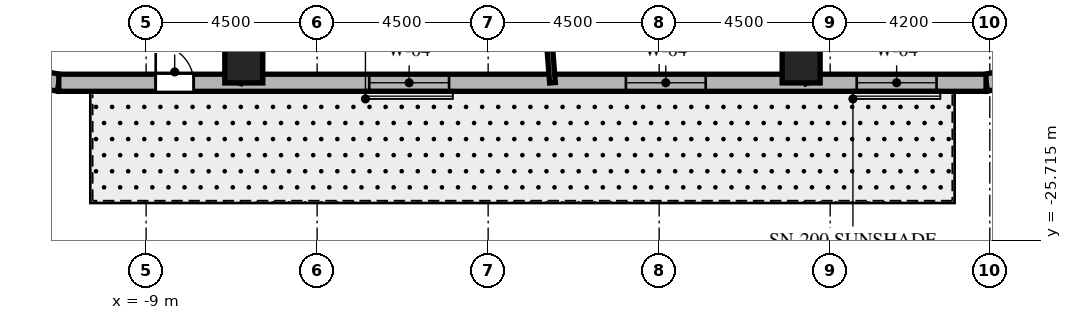
"""IFC4 building model, lengths in metres.
Left out: names, types, materials, properties, quantities, classifications, styles, units other than length and angle.
Written with IfcOpenShell. Run it as: python <this file> out.ifc"""

import sys

from ifc_helpers import new_model, si_unit, direction, frame, frame_2d, origin, origin_2d, place, context, subcontext, project, spatial, rectangle, extrude, element, fill, save


model = new_model("IFC4")
c1 = context("Model", 3, precision=1e-05, world=origin(), true_north=direction((0.0, 1.0)))
c2 = subcontext(c1, "Body", "Model", "MODEL_VIEW")
j1 = project(units=[si_unit("LENGTHUNIT", "METRE"), si_unit("PLANEANGLEUNIT", "RADIAN")], contexts=[c1])
p1 = place(None, origin())
s1 = spatial("IfcSite", under=j1, at=p1, CompositionType="ELEMENT")
p2 = place(p1, origin())
s2 = spatial("IfcBuilding", under=s1, at=p2, CompositionType="ELEMENT")
p3 = place(p2, frame((0.0, 0.0, 210.3)))
s3 = spatial("IfcBuildingStorey", under=s2, at=p3, CompositionType="ELEMENT", Elevation=210.3)
for number, where, z_axis, x_axis in (
    (1, (-6.43, -21.08, 0.0), (0.0, 0.0, 1.0), (1.0, 0.0, 0.0)),
    (2, (8.236, -21.08, 0.0), (0.0, 0.0, 1.0), (1.0, 0.0, 0.0)),
):
    element("IfcColumn", number, at=place(p3, frame(where, z_axis=z_axis, x_axis=x_axis)), inside=s3, PredefinedType="COLUMN", context=c2, shape_type="SweptSolid", body=[
        extrude(rectangle(XDim=1.0, YDim=1.0, at=origin_2d()), origin(), (0.0, 0.0, 1.0), 3.8),
    ])
p4 = place(p3, frame((-12.546, -21.34, 0.0), z_axis=(0.0, 0.0, 1.0), x_axis=(0.982686750835, -0.18527479519, 0.0)))
e3 = element("IfcWall", 3, at=p4, inside=s3, PredefinedType="SOLIDWALL", context=c2, shape_type="SweptSolid", body=[
    extrude(rectangle(XDim=1.27, YDim=0.45, at=frame_2d((0.635, 0.0))), origin(), (0.0, 0.0, 1.0), 3.5),
])
p5 = place(p3, frame((13.102, -21.575, 0.0), z_axis=(0.0, 0.0, 1.0), x_axis=(0.978757421505, 0.205021730188, 0.0)))
e4 = element("IfcWall", 4, at=p5, inside=s3, PredefinedType="SOLIDWALL", context=c2, shape_type="SweptSolid", body=[
    extrude(rectangle(XDim=1.406, YDim=0.45, at=frame_2d((0.703, 0.0))), origin(), (0.0, 0.0, 1.0), 3.5),
])
p6 = place(p3, frame((-11.298, -21.575, 0.0), z_axis=(0.0, 0.0, 1.0), x_axis=(1.0, 0.0, 0.0)))
e5 = element("IfcWall", 5, at=p6, inside=s3, PredefinedType="SOLIDWALL", context=c2, shape_type="SweptSolid", body=[
    extrude(rectangle(XDim=24.399, YDim=0.45, at=frame_2d((12.2, 0.0))), origin(), (0.0, 0.0, 1.0), 3.5),
])
p7 = place(p6, frame((2.55, 0.0, 0.0)))
e6 = element("IfcOpeningElement", 6, at=p7, cuts=e5, PredefinedType="OPENING", context=c2, shape_type="SweptSolid", body=[
    extrude(rectangle(XDim=1.0, YDim=2.15, at=frame_2d((0.5, 1.075))), frame((0.0, 0.235, 0.0), z_axis=(0.0, -1.0, 0.0), x_axis=(1.0, 0.0, 0.0)), (0.0, 0.0, 1.0), 0.47),
])
p8 = place(p6, frame((8.169, 0.0, 0.8)))
e7 = element("IfcOpeningElement", 7, at=p8, cuts=e5, PredefinedType="OPENING", context=c2, shape_type="SweptSolid", body=[
    extrude(rectangle(XDim=2.1, YDim=1.85, at=frame_2d((1.05, 0.925))), frame((0.0, 0.235, 0.0), z_axis=(0.0, -1.0, 0.0), x_axis=(1.0, 0.0, 0.0)), (0.0, 0.0, 1.0), 0.47),
])
p9 = place(p6, frame((14.922, 0.0, 0.8)))
e8 = element("IfcOpeningElement", 8, at=p9, cuts=e5, PredefinedType="OPENING", context=c2, shape_type="SweptSolid", body=[
    extrude(rectangle(XDim=2.1, YDim=1.85, at=frame_2d((1.05, 0.925))), frame((0.0, 0.235, 0.0), z_axis=(0.0, -1.0, 0.0), x_axis=(1.0, 0.0, 0.0)), (0.0, 0.0, 1.0), 0.47),
])
p10 = place(p6, frame((20.996, 0.0, 0.8)))
e9 = element("IfcOpeningElement", 9, at=p10, cuts=e5, PredefinedType="OPENING", context=c2, shape_type="SweptSolid", body=[
    extrude(rectangle(XDim=2.1, YDim=1.85, at=frame_2d((1.05, 0.925))), frame((0.0, 0.235, 0.0), z_axis=(0.0, -1.0, 0.0), x_axis=(1.0, 0.0, 0.0)), (0.0, 0.0, 1.0), 0.47),
])
p11 = place(p3, frame((-3.004, -9.85, 0.0), z_axis=(0.0, 0.0, 1.0), x_axis=(-0.291775760688, -0.956486751333, 0.0)))
e10 = element("IfcWall", 10, at=p11, inside=s3, PredefinedType="PARTITIONING", context=c2, shape_type="SweptSolid", body=[
    extrude(rectangle(XDim=12.258, YDim=0.15, at=frame_2d((6.129, 0.0))), origin(), (0.0, 0.0, 1.0), 2.74),
])
p12 = place(p3, frame((1.1, -14.018, 0.0), z_axis=(0.0, 0.0, 1.0), x_axis=(0.078228275349, -0.996935472804, 0.0)))
e11 = element("IfcWall", 11, at=p12, inside=s3, PredefinedType="PARTITIONING", context=c2, shape_type="SweptSolid", body=[
    extrude(rectangle(XDim=7.581, YDim=0.15, at=frame_2d((3.79, 0.0))), origin(), (0.0, 0.0, 1.0), 2.74),
])
p13 = place(p3, frame((3.848, -9.85, 0.0), z_axis=(0.0, 0.0, 1.0), x_axis=(0.363921778212, -0.931429513889, 0.0)))
e12 = element("IfcWall", 12, at=p13, inside=s3, PredefinedType="PARTITIONING", context=c2, shape_type="SweptSolid", body=[
    extrude(rectangle(XDim=12.588, YDim=0.15, at=frame_2d((6.294, 0.0))), origin(), (0.0, 0.0, 1.0), 2.74),
])
p14 = place(p3, frame((6.444, -9.85, 0.0), z_axis=(0.0, 0.0, 1.0), x_axis=(0.547492333129, -0.836810698525, 0.0)))
e13 = element("IfcWall", 13, at=p14, inside=s3, PredefinedType="PARTITIONING", context=c2, shape_type="SweptSolid", body=[
    extrude(rectangle(XDim=13.616, YDim=0.15, at=frame_2d((6.808, 0.0))), origin(), (0.0, 0.0, 1.0), 2.74),
])
p15 = place(p7, origin())
e14 = element("IfcDoor", 14, at=p15, inside=s3, OperationType="SINGLE_SWING_LEFT", PredefinedType="DOOR", context=c2, shape_type="SweptSolid", body=[
    extrude(rectangle(XDim=1.0, YDim=2.15, at=frame_2d((0.5, 1.075))), frame((0.0, 0.025, 0.0), z_axis=(0.0, -1.0, 0.0), x_axis=(1.0, 0.0, 0.0)), (0.0, 0.0, 1.0), 0.05),
])
fill(e6, e14)
p16 = place(p8, origin())
e15 = element("IfcWindow", 15, at=p16, inside=s3, PartitioningType="SINGLE_PANEL", PredefinedType="WINDOW", context=c2, shape_type="SweptSolid", body=[
    extrude(rectangle(XDim=2.1, YDim=1.85, at=frame_2d((1.05, 0.925))), frame((0.0, 0.03, 0.0), z_axis=(0.0, -1.0, 0.0), x_axis=(1.0, 0.0, 0.0)), (0.0, 0.0, 1.0), 0.06),
])
fill(e7, e15)
p17 = place(p9, origin())
e16 = element("IfcWindow", 16, at=p17, inside=s3, PartitioningType="SINGLE_PANEL", PredefinedType="WINDOW", context=c2, shape_type="SweptSolid", body=[
    extrude(rectangle(XDim=2.1, YDim=1.85, at=frame_2d((1.05, 0.925))), frame((0.0, 0.03, 0.0), z_axis=(0.0, -1.0, 0.0), x_axis=(1.0, 0.0, 0.0)), (0.0, 0.0, 1.0), 0.06),
])
fill(e8, e16)
p18 = place(p10, origin())
e17 = element("IfcWindow", 17, at=p18, inside=s3, PartitioningType="SINGLE_PANEL", PredefinedType="WINDOW", context=c2, shape_type="SweptSolid", body=[
    extrude(rectangle(XDim=2.1, YDim=1.85, at=frame_2d((1.05, 0.925))), frame((0.0, 0.03, 0.0), z_axis=(0.0, -1.0, 0.0), x_axis=(1.0, 0.0, 0.0)), (0.0, 0.0, 1.0), 0.06),
])
fill(e9, e17)
save(model, sys.argv[1])
